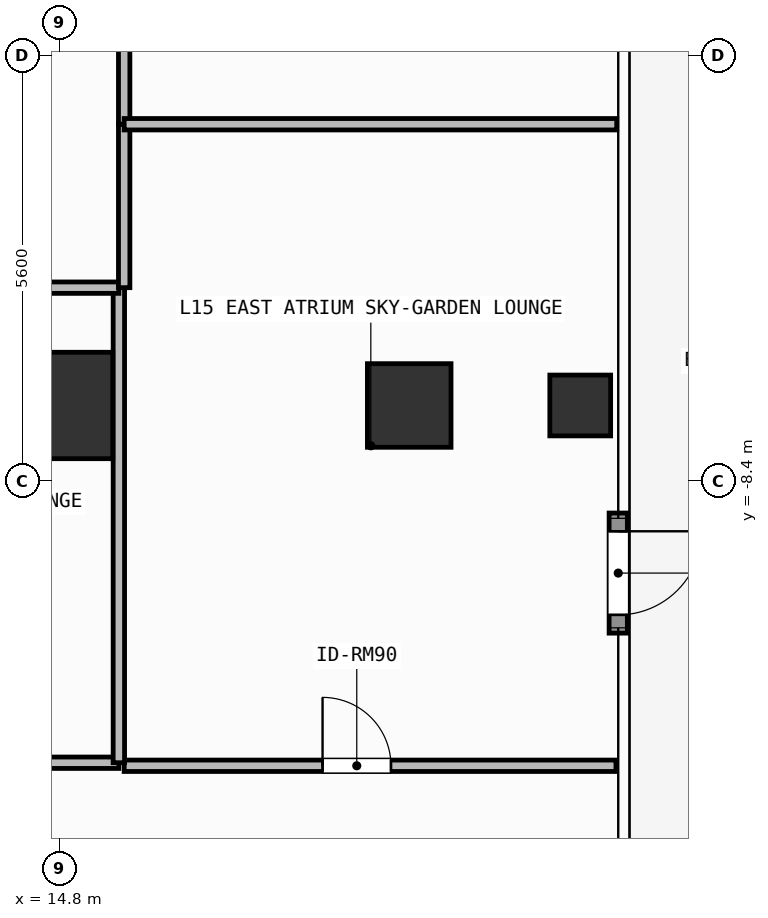
"""IFC4 building model, lengths in metres.
Left out: names, types, materials, properties, quantities, classifications, styles, units other than length and angle.
Written with IfcOpenShell. Run it as: python <this file> out.ifc"""

import sys

from ifc_helpers import new_model, si_unit, direction, frame, frame_2d, origin, origin_2d, place, context, subcontext, project, spatial, rectangle, hollow_rectangle, extrude, element, fill, save


model = new_model("IFC4")
c1 = context("Model", 3, precision=1e-05, world=origin(), true_north=direction((0.0, 1.0)))
c2 = subcontext(c1, "Body", "Model", "MODEL_VIEW")
j1 = project(units=[si_unit("LENGTHUNIT", "METRE"), si_unit("PLANEANGLEUNIT", "RADIAN")], contexts=[c1])
p1 = place(None, origin())
s1 = spatial("IfcSite", under=j1, at=p1, CompositionType="ELEMENT")
p2 = place(p1, origin())
s2 = spatial("IfcBuilding", under=s1, at=p2, CompositionType="ELEMENT")
p3 = place(p2, frame((0.0, 0.0, 57.9)))
s3 = spatial("IfcBuildingStorey", under=s2, at=p3, CompositionType="ELEMENT", Elevation=57.9)
p4 = place(p3, frame((14.8, -7.4, 0.0), z_axis=(0.0, 0.0, 1.0), x_axis=(1.0, 0.0, 0.0)))
e1 = element("IfcColumn", 1, at=p4, inside=s3, PredefinedType="COLUMN", context=c2, shape_type="SweptSolid", body=[
    extrude(rectangle(XDim=1.4, YDim=1.4, at=origin_2d()), origin(), (0.0, 0.0, 1.0), 3.9),
])
p5 = place(p3, frame((19.4, -7.4, 0.0), z_axis=(0.0, 0.0, 1.0), x_axis=(1.0, 0.0, 0.0)))
e2 = element("IfcColumn", 2, at=p5, inside=s3, PredefinedType="COLUMN", context=c2, shape_type="SweptSolid", body=[
    extrude(rectangle(XDim=1.1, YDim=1.1, at=origin_2d()), origin(), (0.0, 0.0, 1.0), 3.9),
])
p6 = place(p3, frame((21.65, -7.4, 0.0), z_axis=(0.0, 0.0, 1.0), x_axis=(1.0, 0.0, 0.0)))
e3 = element("IfcColumn", 3, at=p6, inside=s3, PredefinedType="COLUMN", context=c2, shape_type="SweptSolid", body=[
    extrude(hollow_rectangle(XDim=0.8, YDim=0.8, WallThickness=0.036, at=origin_2d()), origin(), (0.0, 0.0, 1.0), 3.9),
])
p7 = place(p3, frame((22.15, -8.815, 0.0), z_axis=(0.0, 0.0, 1.0), x_axis=(0.0, -1.0, 0.0)))
e4 = element("IfcWall", 4, at=p7, inside=s3, PredefinedType="SOLIDWALL", context=c2, shape_type="SweptSolid", body=[
    extrude(rectangle(XDim=1.58, YDim=0.24, at=frame_2d((0.79, 0.0))), origin(), (0.0, 0.0, 1.0), 3.68),
])
p8 = place(p7, frame((0.24, 0.0, 0.0)))
e5 = element("IfcOpeningElement", 5, at=p8, cuts=e4, PredefinedType="OPENING", context=c2, shape_type="SweptSolid", body=[
    extrude(rectangle(XDim=1.1, YDim=2.2, at=frame_2d((0.55, 1.1))), frame((0.0, 0.13, 0.0), z_axis=(0.0, -1.0, 0.0), x_axis=(1.0, 0.0, 0.0)), (0.0, 0.0, 1.0), 0.26),
])
p9 = place(p3, frame((10.1, -12.1, 0.0), z_axis=(0.0, 0.0, 1.0), x_axis=(1.0, 0.0, 0.0)))
e6 = element("IfcWall", 6, at=p9, inside=s3, PredefinedType="PARTITIONING", context=c2, shape_type="SweptSolid", body=[
    extrude(rectangle(XDim=5.48, YDim=0.15, at=frame_2d((2.74, 0.0))), origin(), (0.0, 0.0, 1.0), 3.68),
])
p10 = place(p9, frame((2.29, 0.0, 0.0)))
e7 = element("IfcOpeningElement", 7, at=p10, cuts=e6, PredefinedType="OPENING", context=c2, shape_type="SweptSolid", body=[
    extrude(rectangle(XDim=0.9, YDim=2.1, at=frame_2d((0.45, 1.05))), frame((0.0, 0.085, 0.0), z_axis=(0.0, -1.0, 0.0), x_axis=(1.0, 0.0, 0.0)), (0.0, 0.0, 1.0), 0.17),
])
p11 = place(p3, frame((15.65, -12.14, 0.0), z_axis=(0.0, 0.0, 1.0), x_axis=(1.0, 0.0, 0.0)))
e8 = element("IfcWall", 8, at=p11, inside=s3, PredefinedType="PARTITIONING", context=c2, shape_type="SweptSolid", body=[
    extrude(rectangle(XDim=6.47, YDim=0.15, at=frame_2d((3.235, 0.0))), origin(), (0.0, 0.0, 1.0), 3.68),
])
p12 = place(p11, frame((2.61, 0.0, 0.0)))
e9 = element("IfcOpeningElement", 9, at=p12, cuts=e8, PredefinedType="OPENING", context=c2, shape_type="SweptSolid", body=[
    extrude(rectangle(XDim=0.9, YDim=2.1, at=frame_2d((0.45, 1.05))), frame((0.0, 0.085, 0.0), z_axis=(0.0, -1.0, 0.0), x_axis=(1.0, 0.0, 0.0)), (0.0, 0.0, 1.0), 0.17),
])
p13 = place(p3, frame((15.58, -12.1, 0.0), z_axis=(0.0, 0.0, 1.0), x_axis=(0.0, 1.0, 0.0)))
e10 = element("IfcWall", 10, at=p13, inside=s3, PredefinedType="PARTITIONING", context=c2, shape_type="SweptSolid", body=[
    extrude(rectangle(XDim=6.25, YDim=0.15, at=frame_2d((3.125, 0.0))), origin(), (0.0, 0.0, 1.0), 3.68),
])
p14 = place(p3, frame((8.96, -5.85, 0.0), z_axis=(0.0, 0.0, 1.0), x_axis=(1.0, 0.0, 0.0)))
e11 = element("IfcWall", 11, at=p14, inside=s3, PredefinedType="PARTITIONING", context=c2, shape_type="SweptSolid", body=[
    extrude(rectangle(XDim=6.62, YDim=0.15, at=frame_2d((3.31, 0.0))), origin(), (0.0, 0.0, 1.0), 3.68),
])
p15 = place(p3, frame((15.65, -5.85, 0.0), z_axis=(0.0, 0.0, 1.0), x_axis=(0.0, 1.0, 0.0)))
e12 = element("IfcWall", 12, at=p15, inside=s3, PredefinedType="PARTITIONING", context=c2, shape_type="SweptSolid", body=[
    extrude(rectangle(XDim=2.15, YDim=0.15, at=frame_2d((1.075, 0.0))), origin(), (0.0, 0.0, 1.0), 3.68),
])
p16 = place(p3, frame((15.65, -3.7, 0.0), z_axis=(0.0, 0.0, 1.0), x_axis=(0.0, 1.0, 0.0)))
e13 = element("IfcWall", 13, at=p16, inside=s3, PredefinedType="PARTITIONING", context=c2, shape_type="SweptSolid", body=[
    extrude(rectangle(XDim=9.55, YDim=0.15, at=frame_2d((4.775, 0.0))), origin(), (0.0, 0.0, 1.0), 3.68),
])
p17 = place(p3, frame((15.65, -3.7, 0.0), z_axis=(0.0, 0.0, 1.0), x_axis=(1.0, 0.0, 0.0)))
e14 = element("IfcWall", 14, at=p17, inside=s3, PredefinedType="PARTITIONING", context=c2, shape_type="SweptSolid", body=[
    extrude(rectangle(XDim=6.48, YDim=0.15, at=frame_2d((3.24, 0.0))), origin(), (0.0, 0.0, 1.0), 3.68),
])
p18 = place(p8, origin())
e15 = element("IfcDoor", 15, at=p18, inside=s3, OperationType="SINGLE_SWING_LEFT", PredefinedType="DOOR", context=c2, shape_type="SweptSolid", body=[
    extrude(rectangle(XDim=1.1, YDim=2.2, at=frame_2d((0.55, 1.1))), frame((0.0, 0.025, 0.0), z_axis=(0.0, -1.0, 0.0), x_axis=(1.0, 0.0, 0.0)), (0.0, 0.0, 1.0), 0.05),
])
fill(e5, e15)
p19 = place(p12, origin())
e16 = element("IfcDoor", 16, at=p19, inside=s3, OperationType="SINGLE_SWING_LEFT", PredefinedType="DOOR", context=c2, shape_type="SweptSolid", body=[
    extrude(rectangle(XDim=0.9, YDim=2.1, at=frame_2d((0.45, 1.05))), frame((0.0, 0.025, 0.0), z_axis=(0.0, -1.0, 0.0), x_axis=(1.0, 0.0, 0.0)), (0.0, 0.0, 1.0), 0.05),
])
fill(e9, e16)
save(model, sys.argv[1])
